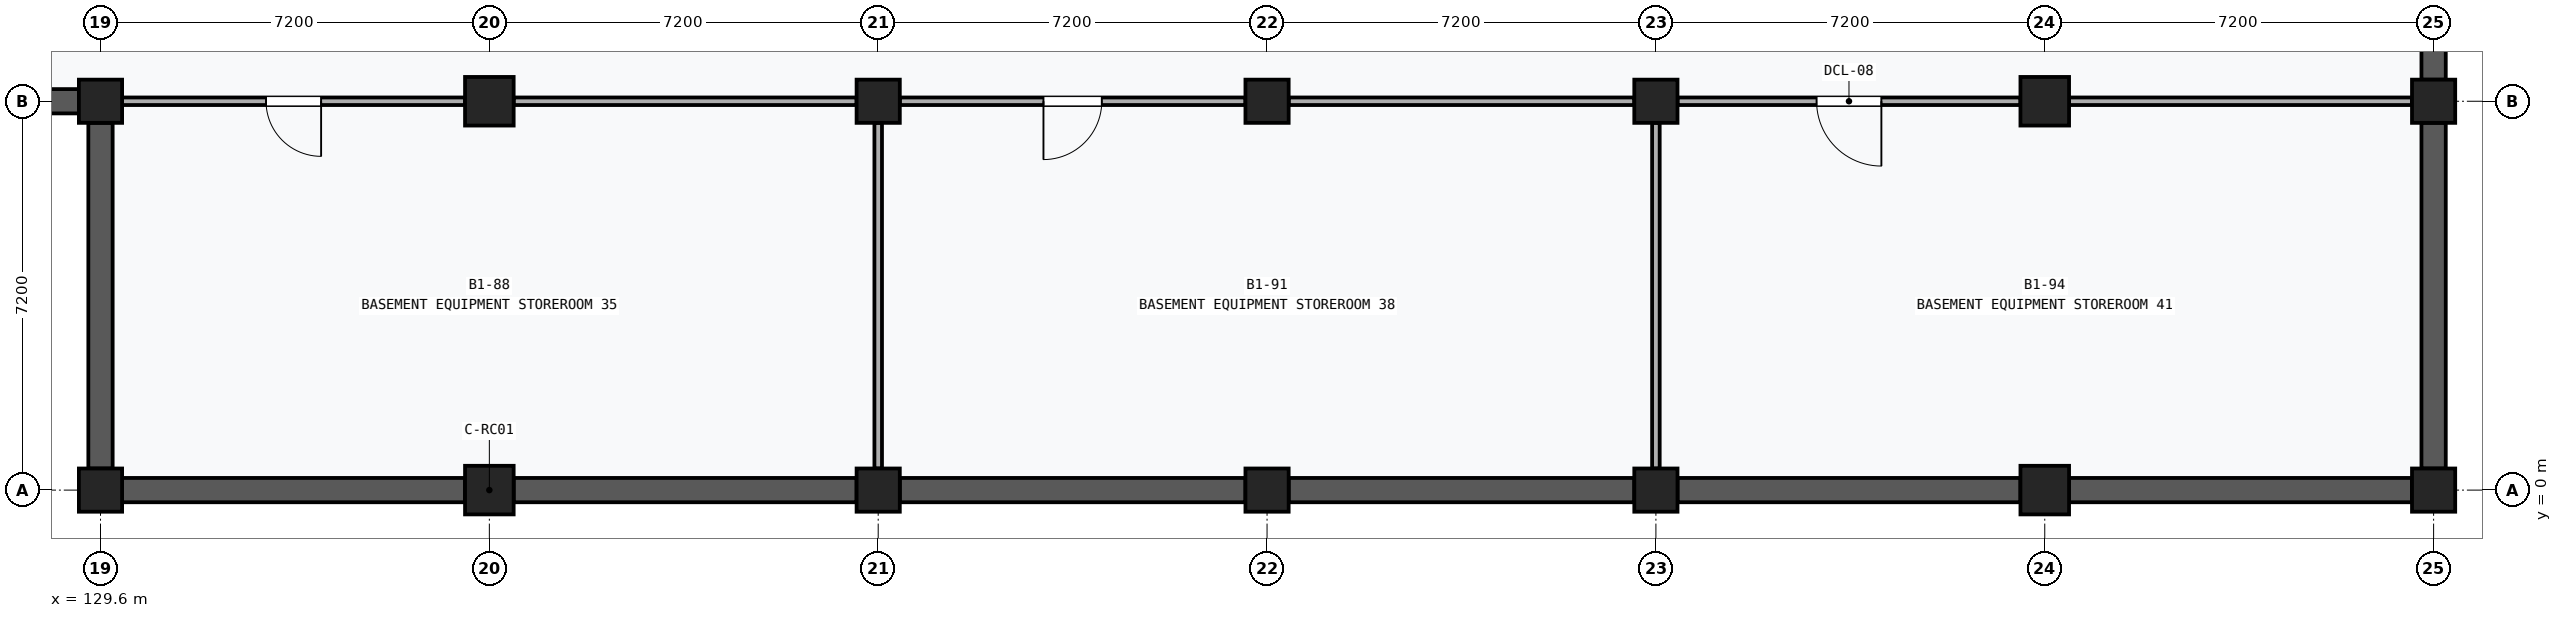
"""IFC4 building model, lengths in metres.
Left out: names, types, materials, properties, quantities, classifications, styles, units other than length and angle.
Written with IfcOpenShell. Run it as: python <this file> out.ifc"""

import sys

from ifc_helpers import new_model, si_unit, direction, frame, frame_2d, origin, origin_2d, place, context, subcontext, project, spatial, rectangle, extrude, element, fill, save


model = new_model("IFC4")
c1 = context("Model", 3, precision=1e-05, world=origin(), true_north=direction((0.0, 1.0)))
c2 = subcontext(c1, "Body", "Model", "MODEL_VIEW")
j1 = project(units=[si_unit("LENGTHUNIT", "METRE"), si_unit("PLANEANGLEUNIT", "RADIAN")], contexts=[c1])
p1 = place(None, origin())
s1 = spatial("IfcSite", under=j1, at=p1, CompositionType="ELEMENT")
p2 = place(p1, origin())
s2 = spatial("IfcBuilding", under=s1, at=p2, CompositionType="ELEMENT")
p3 = place(p2, frame((0.0, 0.0, -4.5)))
s3 = spatial("IfcBuildingStorey", under=s2, at=p3, CompositionType="ELEMENT", Elevation=-4.5)
for number, where, z_axis, x_axis in (
    (1, (129.6, 0.0, 0.0), (0.0, 0.0, 1.0), (1.0, 0.0, 0.0)),
    (2, (129.6, 7.2, 0.0), (0.0, 0.0, 1.0), (1.0, 0.0, 0.0)),
):
    element("IfcColumn", number, at=place(p3, frame(where, z_axis=z_axis, x_axis=x_axis)), inside=s3, PredefinedType="COLUMN", context=c2, shape_type="SweptSolid", body=[
        extrude(rectangle(XDim=0.8, YDim=0.8, at=origin_2d()), origin(), (0.0, 0.0, 1.0), 4.5),
    ])
for number, where, z_axis, x_axis in (
    (3, (136.8, 0.0, 0.0), (0.0, 0.0, 1.0), (1.0, 0.0, 0.0)),
    (4, (136.8, 7.2, 0.0), (0.0, 0.0, 1.0), (1.0, 0.0, 0.0)),
):
    element("IfcColumn", number, at=place(p3, frame(where, z_axis=z_axis, x_axis=x_axis)), inside=s3, PredefinedType="COLUMN", context=c2, shape_type="SweptSolid", body=[
        extrude(rectangle(XDim=0.9, YDim=0.9, at=origin_2d()), origin(), (0.0, 0.0, 1.0), 4.5),
    ])
for number, where, z_axis, x_axis in (
    (5, (144.0, 0.0, 0.0), (0.0, 0.0, 1.0), (1.0, 0.0, 0.0)),
    (6, (144.0, 7.2, 0.0), (0.0, 0.0, 1.0), (1.0, 0.0, 0.0)),
    (7, (151.2, 0.0, 0.0), (0.0, 0.0, 1.0), (1.0, 0.0, 0.0)),
    (8, (151.2, 7.2, 0.0), (0.0, 0.0, 1.0), (1.0, 0.0, 0.0)),
    (9, (158.4, 0.0, 0.0), (0.0, 0.0, 1.0), (1.0, 0.0, 0.0)),
    (10, (158.4, 7.2, 0.0), (0.0, 0.0, 1.0), (1.0, 0.0, 0.0)),
):
    element("IfcColumn", number, at=place(p3, frame(where, z_axis=z_axis, x_axis=x_axis)), inside=s3, PredefinedType="COLUMN", context=c2, shape_type="SweptSolid", body=[
        extrude(rectangle(XDim=0.8, YDim=0.8, at=origin_2d()), origin(), (0.0, 0.0, 1.0), 4.5),
    ])
for number, where, z_axis, x_axis in (
    (11, (165.6, 0.0, 0.0), (0.0, 0.0, 1.0), (1.0, 0.0, 0.0)),
    (12, (165.6, 7.2, 0.0), (0.0, 0.0, 1.0), (1.0, 0.0, 0.0)),
):
    element("IfcColumn", number, at=place(p3, frame(where, z_axis=z_axis, x_axis=x_axis)), inside=s3, PredefinedType="COLUMN", context=c2, shape_type="SweptSolid", body=[
        extrude(rectangle(XDim=0.9, YDim=0.9, at=origin_2d()), origin(), (0.0, 0.0, 1.0), 4.5),
    ])
for number, where, z_axis, x_axis in (
    (13, (172.8, 0.0, 0.0), (0.0, 0.0, 1.0), (1.0, 0.0, 0.0)),
    (14, (172.8, 7.2, 0.0), (0.0, 0.0, 1.0), (1.0, 0.0, 0.0)),
):
    element("IfcColumn", number, at=place(p3, frame(where, z_axis=z_axis, x_axis=x_axis)), inside=s3, PredefinedType="COLUMN", context=c2, shape_type="SweptSolid", body=[
        extrude(rectangle(XDim=0.8, YDim=0.8, at=origin_2d()), origin(), (0.0, 0.0, 1.0), 4.5),
    ])
p4 = place(p3, frame((122.8, 7.2, 0.0), z_axis=(0.0, 0.0, 1.0), x_axis=(1.0, 0.0, 0.0)))
e15 = element("IfcWall", 15, at=p4, inside=s3, PredefinedType="SOLIDWALL", context=c2, shape_type="SweptSolid", body=[
    extrude(rectangle(XDim=6.4, YDim=0.45, at=frame_2d((3.2, 0.0))), origin(), (0.0, 0.0, 1.0), 3.57),
])
p5 = place(p3, frame((130.0, 0.0, 0.0), z_axis=(0.0, 0.0, 1.0), x_axis=(1.0, 0.0, 0.0)))
e16 = element("IfcWall", 16, at=p5, inside=s3, PredefinedType="SOLIDWALL", context=c2, shape_type="SweptSolid", body=[
    extrude(rectangle(XDim=6.35, YDim=0.45, at=frame_2d((3.175, 0.0))), origin(), (0.0, 0.0, 1.0), 3.57),
])
p6 = place(p3, frame((129.6, 0.4, 0.0), z_axis=(0.0, 0.0, 1.0), x_axis=(0.0, 1.0, 0.0)))
e17 = element("IfcWall", 17, at=p6, inside=s3, PredefinedType="SOLIDWALL", context=c2, shape_type="SweptSolid", body=[
    extrude(rectangle(XDim=6.4, YDim=0.45, at=frame_2d((3.2, 0.0))), origin(), (0.0, 0.0, 1.0), 3.57),
])
p7 = place(p3, frame((137.25, 0.0, 0.0), z_axis=(0.0, 0.0, 1.0), x_axis=(1.0, 0.0, 0.0)))
e18 = element("IfcWall", 18, at=p7, inside=s3, PredefinedType="SOLIDWALL", context=c2, shape_type="SweptSolid", body=[
    extrude(rectangle(XDim=6.35, YDim=0.45, at=frame_2d((3.175, 0.0))), origin(), (0.0, 0.0, 1.0), 3.57),
])
p8 = place(p3, frame((144.4, 0.0, 0.0), z_axis=(0.0, 0.0, 1.0), x_axis=(1.0, 0.0, 0.0)))
e19 = element("IfcWall", 19, at=p8, inside=s3, PredefinedType="SOLIDWALL", context=c2, shape_type="SweptSolid", body=[
    extrude(rectangle(XDim=6.4, YDim=0.45, at=frame_2d((3.2, 0.0))), origin(), (0.0, 0.0, 1.0), 3.57),
])
p9 = place(p3, frame((151.6, 0.0, 0.0), z_axis=(0.0, 0.0, 1.0), x_axis=(1.0, 0.0, 0.0)))
e20 = element("IfcWall", 20, at=p9, inside=s3, PredefinedType="SOLIDWALL", context=c2, shape_type="SweptSolid", body=[
    extrude(rectangle(XDim=6.4, YDim=0.45, at=frame_2d((3.2, 0.0))), origin(), (0.0, 0.0, 1.0), 3.57),
])
for number, where, z_axis, x_axis in (
    (21, (158.8, 0.0, 0.0), (0.0, 0.0, 1.0), (1.0, 0.0, 0.0)),
    (22, (166.05, 0.0, 0.0), (0.0, 0.0, 1.0), (1.0, 0.0, 0.0)),
):
    element("IfcWall", number, at=place(p3, frame(where, z_axis=z_axis, x_axis=x_axis)), inside=s3, PredefinedType="SOLIDWALL", context=c2, shape_type="SweptSolid", body=[
        extrude(rectangle(XDim=6.35, YDim=0.45, at=frame_2d((3.175, 0.0))), origin(), (0.0, 0.0, 1.0), 3.57),
    ])
p10 = place(p3, frame((172.8, 0.4, 0.0), z_axis=(0.0, 0.0, 1.0), x_axis=(0.0, 1.0, 0.0)))
e23 = element("IfcWall", 23, at=p10, inside=s3, PredefinedType="SOLIDWALL", context=c2, shape_type="SweptSolid", body=[
    extrude(rectangle(XDim=6.4, YDim=0.45, at=frame_2d((3.2, 0.0))), origin(), (0.0, 0.0, 1.0), 3.57),
])
p11 = place(p3, frame((172.8, 7.6, 0.0), z_axis=(0.0, 0.0, 1.0), x_axis=(0.0, 1.0, 0.0)))
e24 = element("IfcWall", 24, at=p11, inside=s3, PredefinedType="SOLIDWALL", context=c2, shape_type="SweptSolid", body=[
    extrude(rectangle(XDim=6.4, YDim=0.45, at=frame_2d((3.2, 0.0))), origin(), (0.0, 0.0, 1.0), 3.57),
])
p12 = place(p3, frame((130.0, 7.2, 0.0), z_axis=(0.0, 0.0, 1.0), x_axis=(1.0, 0.0, 0.0)))
e25 = element("IfcWall", 25, at=p12, inside=s3, PredefinedType="PARTITIONING", context=c2, shape_type="SweptSolid", body=[
    extrude(rectangle(XDim=6.35, YDim=0.14, at=frame_2d((3.175, 0.0))), origin(), (0.0, 0.0, 1.0), 3.3),
])
p13 = place(p12, frame((2.665, 0.0, 0.0)))
e26 = element("IfcOpeningElement", 26, at=p13, cuts=e25, PredefinedType="OPENING", context=c2, shape_type="SweptSolid", body=[
    extrude(rectangle(XDim=1.02, YDim=2.12, at=frame_2d((0.51, 1.06))), frame((0.0, 0.082, 0.0), z_axis=(0.0, -1.0, 0.0), x_axis=(1.0, 0.0, 0.0)), (0.0, 0.0, 1.0), 0.164),
])
p14 = place(p3, frame((137.25, 7.2, 0.0), z_axis=(0.0, 0.0, 1.0), x_axis=(1.0, 0.0, 0.0)))
e27 = element("IfcWall", 27, at=p14, inside=s3, PredefinedType="PARTITIONING", context=c2, shape_type="SweptSolid", body=[
    extrude(rectangle(XDim=6.35, YDim=0.14, at=frame_2d((3.175, 0.0))), origin(), (0.0, 0.0, 1.0), 3.3),
])
p15 = place(p3, frame((144.0, 0.4, 0.0), z_axis=(0.0, 0.0, 1.0), x_axis=(0.0, 1.0, 0.0)))
e28 = element("IfcWall", 28, at=p15, inside=s3, PredefinedType="PARTITIONING", context=c2, shape_type="SweptSolid", body=[
    extrude(rectangle(XDim=6.4, YDim=0.14, at=frame_2d((3.2, 0.0))), origin(), (0.0, 0.0, 1.0), 3.3),
])
p16 = place(p3, frame((144.4, 7.2, 0.0), z_axis=(0.0, 0.0, 1.0), x_axis=(1.0, 0.0, 0.0)))
e29 = element("IfcWall", 29, at=p16, inside=s3, PredefinedType="PARTITIONING", context=c2, shape_type="SweptSolid", body=[
    extrude(rectangle(XDim=6.4, YDim=0.14, at=frame_2d((3.2, 0.0))), origin(), (0.0, 0.0, 1.0), 3.3),
])
p17 = place(p16, frame((2.66, 0.0, 0.0)))
e30 = element("IfcOpeningElement", 30, at=p17, cuts=e29, PredefinedType="OPENING", context=c2, shape_type="SweptSolid", body=[
    extrude(rectangle(XDim=1.08, YDim=2.18, at=frame_2d((0.54, 1.09))), frame((0.0, 0.082, 0.0), z_axis=(0.0, -1.0, 0.0), x_axis=(1.0, 0.0, 0.0)), (0.0, 0.0, 1.0), 0.164),
])
p18 = place(p3, frame((151.6, 7.2, 0.0), z_axis=(0.0, 0.0, 1.0), x_axis=(1.0, 0.0, 0.0)))
e31 = element("IfcWall", 31, at=p18, inside=s3, PredefinedType="PARTITIONING", context=c2, shape_type="SweptSolid", body=[
    extrude(rectangle(XDim=6.4, YDim=0.14, at=frame_2d((3.2, 0.0))), origin(), (0.0, 0.0, 1.0), 3.3),
])
p19 = place(p3, frame((158.4, 0.4, 0.0), z_axis=(0.0, 0.0, 1.0), x_axis=(0.0, 1.0, 0.0)))
e32 = element("IfcWall", 32, at=p19, inside=s3, PredefinedType="PARTITIONING", context=c2, shape_type="SweptSolid", body=[
    extrude(rectangle(XDim=6.4, YDim=0.14, at=frame_2d((3.2, 0.0))), origin(), (0.0, 0.0, 1.0), 3.3),
])
p20 = place(p3, frame((158.8, 7.2, 0.0), z_axis=(0.0, 0.0, 1.0), x_axis=(1.0, 0.0, 0.0)))
e33 = element("IfcWall", 33, at=p20, inside=s3, PredefinedType="PARTITIONING", context=c2, shape_type="SweptSolid", body=[
    extrude(rectangle(XDim=6.35, YDim=0.14, at=frame_2d((3.175, 0.0))), origin(), (0.0, 0.0, 1.0), 3.3),
])
p21 = place(p20, frame((2.575, 0.0, 0.0)))
e34 = element("IfcOpeningElement", 34, at=p21, cuts=e33, PredefinedType="OPENING", context=c2, shape_type="SweptSolid", body=[
    extrude(rectangle(XDim=1.2, YDim=2.24, at=frame_2d((0.6, 1.12))), frame((0.0, 0.082, 0.0), z_axis=(0.0, -1.0, 0.0), x_axis=(1.0, 0.0, 0.0)), (0.0, 0.0, 1.0), 0.164),
])
p22 = place(p3, frame((166.05, 7.2, 0.0), z_axis=(0.0, 0.0, 1.0), x_axis=(1.0, 0.0, 0.0)))
e35 = element("IfcWall", 35, at=p22, inside=s3, PredefinedType="PARTITIONING", context=c2, shape_type="SweptSolid", body=[
    extrude(rectangle(XDim=6.35, YDim=0.14, at=frame_2d((3.175, 0.0))), origin(), (0.0, 0.0, 1.0), 3.3),
])
p23 = place(p13, frame((1.02, 0.0, 0.0), z_axis=(0.0, 0.0, 1.0), x_axis=(-1.0, 0.0, 0.0)))
e36 = element("IfcDoor", 36, at=p23, inside=s3, OperationType="SINGLE_SWING_LEFT", PredefinedType="DOOR", context=c2, shape_type="SweptSolid", body=[
    extrude(rectangle(XDim=1.02, YDim=2.12, at=frame_2d((0.51, 1.06))), frame((0.0, 0.025, 0.0), z_axis=(0.0, -1.0, 0.0), x_axis=(1.0, 0.0, 0.0)), (0.0, 0.0, 1.0), 0.05),
])
fill(e26, e36)
p24 = place(p17, frame((1.08, 0.0, 0.0), z_axis=(0.0, 0.0, 1.0), x_axis=(-1.0, 0.0, 0.0)))
e37 = element("IfcDoor", 37, at=p24, inside=s3, OperationType="SINGLE_SWING_RIGHT", PredefinedType="DOOR", context=c2, shape_type="SweptSolid", body=[
    extrude(rectangle(XDim=1.08, YDim=2.18, at=frame_2d((0.54, 1.09))), frame((0.0, 0.025, 0.0), z_axis=(0.0, -1.0, 0.0), x_axis=(1.0, 0.0, 0.0)), (0.0, 0.0, 1.0), 0.05),
])
fill(e30, e37)
p25 = place(p21, frame((1.2, 0.0, 0.0), z_axis=(0.0, 0.0, 1.0), x_axis=(-1.0, 0.0, 0.0)))
e38 = element("IfcDoor", 38, at=p25, inside=s3, OperationType="SINGLE_SWING_LEFT", PredefinedType="DOOR", context=c2, shape_type="SweptSolid", body=[
    extrude(rectangle(XDim=1.2, YDim=2.24, at=frame_2d((0.6, 1.12))), frame((0.0, 0.025, 0.0), z_axis=(0.0, -1.0, 0.0), x_axis=(1.0, 0.0, 0.0)), (0.0, 0.0, 1.0), 0.05),
])
fill(e34, e38)
save(model, sys.argv[1])
